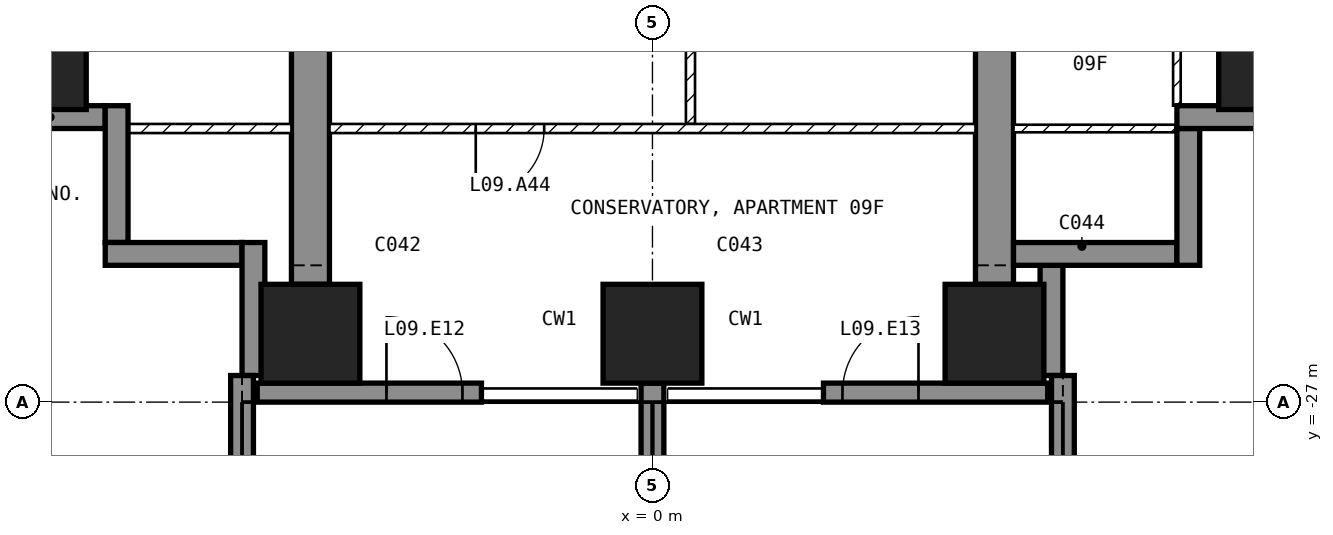
"""IFC4 building model, lengths in metres.
Left out: names, types, materials, properties, quantities, classifications, styles, units other than length and angle.
Written with IfcOpenShell. Run it as: python <this file> out.ifc"""

import sys

from ifc_helpers import new_model, si_unit, direction, frame, frame_2d, origin, origin_2d, place, context, subcontext, project, spatial, polyline, rectangle, outline, extrude, element, fill, save


model = new_model("IFC4")
c1 = context("Model", 3, precision=1e-05, world=origin(), true_north=direction((0.0, 1.0)))
c2 = subcontext(c1, "Body", "Model", "MODEL_VIEW")
j1 = project(units=[si_unit("LENGTHUNIT", "METRE"), si_unit("PLANEANGLEUNIT", "RADIAN")], contexts=[c1])
p1 = place(None, origin())
s1 = spatial("IfcSite", under=j1, at=p1, CompositionType="ELEMENT")
p2 = place(p1, origin())
s2 = spatial("IfcBuilding", under=s1, at=p2, CompositionType="ELEMENT")
p3 = place(p2, frame((0.0, 0.0, 50.5)))
s3 = spatial("IfcBuildingStorey", under=s2, at=p3, CompositionType="ELEMENT", Elevation=50.5)
for number, where, z_axis, x_axis in (
    (1, (-8.1, -22.5, -0.25), (0.0, 0.0, 1.0), (1.0, 0.0, 0.0)),
    (2, (-4.5, -26.1, -0.25), (0.0, 0.0, 1.0), (1.0, 0.0, 0.0)),
    (3, (0.0, -26.1, -0.25), (0.0, 0.0, 1.0), (1.0, 0.0, 0.0)),
    (4, (4.5, -26.1, -0.25), (0.0, 0.0, 1.0), (1.0, 0.0, 0.0)),
    (5, (8.1, -22.5, -0.25), (0.0, 0.0, 1.0), (1.0, 0.0, 0.0)),
):
    element("IfcColumn", number, at=place(p3, frame(where, z_axis=z_axis, x_axis=x_axis)), inside=s3, PredefinedType="COLUMN", context=c2, shape_type="SweptSolid", body=[
        extrude(rectangle(XDim=1.3, YDim=1.3, at=origin_2d()), origin(), (0.0, 0.0, 1.0), 3.5),
    ])
for number, where, z_axis, x_axis in (
    (6, (-4.75, -25.45, -0.25), (1.0, 0.0, 0.0), (0.0, 1.0, 0.0)),
    (7, (4.25, -25.45, -0.25), (1.0, 0.0, 0.0), (0.0, 1.0, 0.0)),
):
    element("IfcWall", number, at=place(p3, frame(where, z_axis=z_axis, x_axis=x_axis)), inside=s3, PredefinedType="SHEAR", context=c2, shape_type="SweptSolid", body=[
        extrude(outline(polyline([(0.0, 0.0), (4.15, 0.0), (4.15, 2.65), (6.55, 2.65), (6.55, 0.0), (11.95, 0.0), (11.95, 2.65), (14.35, 2.65), (14.35, 0.0), (16.45, 0.0), (16.45, 3.5), (0.0, 3.5), (0.0, 0.0)])), origin(), (0.0, 0.0, 1.0), 0.5),
    ])
p4 = place(p3, frame((-5.2, -26.875, 0.0), z_axis=(0.0, 0.0, 1.0), x_axis=(1.0, 0.0, 0.0)))
e8 = element("IfcWall", 8, at=p4, inside=s3, PredefinedType="SOLIDWALL", context=c2, shape_type="SweptSolid", body=[
    extrude(rectangle(XDim=2.95, YDim=0.25, at=frame_2d((1.475, 0.0))), origin(), (0.0, 0.0, 1.0), 3.25),
])
p5 = place(p4, frame((1.7, 0.0, 0.0)))
e9 = element("IfcOpeningElement", 9, at=p5, cuts=e8, PredefinedType="OPENING", context=c2, shape_type="SweptSolid", body=[
    extrude(rectangle(XDim=1.0, YDim=2.4, at=frame_2d((0.5, 1.2))), frame((0.0, 0.135, 0.0), z_axis=(0.0, -1.0, 0.0), x_axis=(1.0, 0.0, 0.0)), (0.0, 0.0, 1.0), 0.27),
])
p6 = place(p3, frame((2.25, -26.875, 0.0), z_axis=(0.0, 0.0, 1.0), x_axis=(1.0, 0.0, 0.0)))
e10 = element("IfcWall", 10, at=p6, inside=s3, PredefinedType="SOLIDWALL", context=c2, shape_type="SweptSolid", body=[
    extrude(rectangle(XDim=2.95, YDim=0.25, at=frame_2d((1.475, 0.0))), origin(), (0.0, 0.0, 1.0), 3.25),
])
p7 = place(p6, frame((0.25, 0.0, 0.0)))
e11 = element("IfcOpeningElement", 11, at=p7, cuts=e10, PredefinedType="OPENING", context=c2, shape_type="SweptSolid", body=[
    extrude(rectangle(XDim=1.0, YDim=2.4, at=frame_2d((0.5, 1.2))), frame((0.0, 0.135, 0.0), z_axis=(0.0, -1.0, 0.0), x_axis=(1.0, 0.0, 0.0)), (0.0, 0.0, 1.0), 0.27),
])
p8 = place(p3, frame((5.25, -26.65, 0.0), z_axis=(0.0, 0.0, 1.0), x_axis=(0.0, 1.0, 0.0)))
e12 = element("IfcWall", 12, at=p8, inside=s3, PredefinedType="SOLIDWALL", context=c2, shape_type="SweptSolid", body=[
    extrude(rectangle(XDim=1.45, YDim=0.3, at=frame_2d((0.725, 0.0))), origin(), (0.0, 0.0, 1.0), 3.25),
])
p9 = place(p3, frame((4.75, -25.05, 0.0), z_axis=(0.0, 0.0, 1.0), x_axis=(1.0, 0.0, 0.0)))
e13 = element("IfcWall", 13, at=p9, inside=s3, PredefinedType="SOLIDWALL", context=c2, shape_type="SweptSolid", body=[
    extrude(rectangle(XDim=2.15, YDim=0.3, at=frame_2d((1.075, 0.0))), origin(), (0.0, 0.0, 1.0), 3.25),
])
p10 = place(p3, frame((7.05, -25.2, 0.0), z_axis=(0.0, 0.0, 1.0), x_axis=(0.0, 1.0, 0.0)))
e14 = element("IfcWall", 14, at=p10, inside=s3, PredefinedType="SOLIDWALL", context=c2, shape_type="SweptSolid", body=[
    extrude(rectangle(XDim=1.8, YDim=0.3, at=frame_2d((0.9, 0.0))), origin(), (0.0, 0.0, 1.0), 3.25),
])
p11 = place(p3, frame((6.9, -23.25, 0.0), z_axis=(0.0, 0.0, 1.0), x_axis=(1.0, 0.0, 0.0)))
e15 = element("IfcWall", 15, at=p11, inside=s3, PredefinedType="SOLIDWALL", context=c2, shape_type="SweptSolid", body=[
    extrude(rectangle(XDim=1.75, YDim=0.3, at=frame_2d((0.875, 0.0))), origin(), (0.0, 0.0, 1.0), 3.25),
])
p12 = place(p3, frame((-8.65, -23.25, 0.0), z_axis=(0.0, 0.0, 1.0), x_axis=(1.0, 0.0, 0.0)))
e16 = element("IfcWall", 16, at=p12, inside=s3, PredefinedType="SOLIDWALL", context=c2, shape_type="SweptSolid", body=[
    extrude(rectangle(XDim=1.45, YDim=0.3, at=frame_2d((0.725, 0.0))), origin(), (0.0, 0.0, 1.0), 3.25),
])
p13 = place(p3, frame((-7.05, -23.1, 0.0), z_axis=(0.0, 0.0, 1.0), x_axis=(0.0, -1.0, 0.0)))
e17 = element("IfcWall", 17, at=p13, inside=s3, PredefinedType="SOLIDWALL", context=c2, shape_type="SweptSolid", body=[
    extrude(rectangle(XDim=1.8, YDim=0.3, at=frame_2d((0.9, 0.0))), origin(), (0.0, 0.0, 1.0), 3.25),
])
p14 = place(p3, frame((-7.2, -25.05, 0.0), z_axis=(0.0, 0.0, 1.0), x_axis=(1.0, 0.0, 0.0)))
e18 = element("IfcWall", 18, at=p14, inside=s3, PredefinedType="SOLIDWALL", context=c2, shape_type="SweptSolid", body=[
    extrude(rectangle(XDim=1.8, YDim=0.3, at=frame_2d((0.9, 0.0))), origin(), (0.0, 0.0, 1.0), 3.25),
])
p15 = place(p3, frame((-5.25, -24.9, 0.0), z_axis=(0.0, 0.0, 1.0), x_axis=(0.0, -1.0, 0.0)))
e19 = element("IfcWall", 19, at=p15, inside=s3, PredefinedType="SOLIDWALL", context=c2, shape_type="SweptSolid", body=[
    extrude(rectangle(XDim=1.75, YDim=0.3, at=frame_2d((0.875, 0.0))), origin(), (0.0, 0.0, 1.0), 3.25),
])
p16 = place(p3, frame((-5.4, -26.65, 0.0), z_axis=(0.0, 0.0, 1.0), x_axis=(0.0, -1.0, 0.0)))
e20 = element("IfcWall", 20, at=p16, inside=s3, PredefinedType="SOLIDWALL", context=c2, shape_type="SweptSolid", body=[
    extrude(rectangle(XDim=3.05, YDim=0.3, at=frame_2d((1.525, 0.0))), origin(), (0.0, 0.0, 1.0), 3.25),
])
p17 = place(p3, frame((0.0, -26.75, 0.0), z_axis=(0.0, 0.0, 1.0), x_axis=(0.0, -1.0, 0.0)))
e21 = element("IfcWall", 21, at=p17, inside=s3, PredefinedType="SOLIDWALL", context=c2, shape_type="SweptSolid", body=[
    extrude(rectangle(XDim=2.95, YDim=0.3, at=frame_2d((1.475, 0.0))), origin(), (0.0, 0.0, 1.0), 3.25),
])
p18 = place(p3, frame((5.4, -26.65, 0.0), z_axis=(0.0, 0.0, 1.0), x_axis=(0.0, -1.0, 0.0)))
e22 = element("IfcWall", 22, at=p18, inside=s3, PredefinedType="SOLIDWALL", context=c2, shape_type="SweptSolid", body=[
    extrude(rectangle(XDim=3.05, YDim=0.3, at=frame_2d((1.525, 0.0))), origin(), (0.0, 0.0, 1.0), 3.25),
])
p19 = place(p3, frame((0.5, -18.96, 0.0), z_axis=(0.0, 0.0, 1.0), x_axis=(0.0, -1.0, 0.0)))
e23 = element("IfcWall", 23, at=p19, inside=s3, PredefinedType="PARTITIONING", context=c2, shape_type="SweptSolid", body=[
    extrude(rectangle(XDim=4.38, YDim=0.12, at=frame_2d((2.19, 0.0))), origin(), (0.0, 0.0, 1.0), 3.25),
])
p20 = place(p19, frame((1.74, 0.0, 0.0)))
e24 = element("IfcOpeningElement", 24, at=p20, cuts=e23, PredefinedType="OPENING", context=c2, shape_type="SweptSolid", body=[
    extrude(rectangle(XDim=0.9, YDim=2.1, at=frame_2d((0.45, 1.05))), frame((0.0, 0.07, 0.0), z_axis=(0.0, -1.0, 0.0), x_axis=(1.0, 0.0, 0.0)), (0.0, 0.0, 1.0), 0.14),
])
p21 = place(p3, frame((4.25, -23.4, 0.0), z_axis=(0.0, 0.0, 1.0), x_axis=(-1.0, 0.0, 0.0)))
e25 = element("IfcWall", 25, at=p21, inside=s3, PredefinedType="PARTITIONING", context=c2, shape_type="SweptSolid", body=[
    extrude(rectangle(XDim=8.5, YDim=0.12, at=frame_2d((4.25, 0.0))), origin(), (0.0, 0.0, 1.0), 3.25),
])
p22 = place(p21, frame((5.675, 0.0, 0.0)))
e26 = element("IfcOpeningElement", 26, at=p22, cuts=e25, PredefinedType="OPENING", context=c2, shape_type="SweptSolid", body=[
    extrude(rectangle(XDim=0.9, YDim=2.1, at=frame_2d((0.45, 1.05))), frame((0.0, 0.07, 0.0), z_axis=(0.0, -1.0, 0.0), x_axis=(1.0, 0.0, 0.0)), (0.0, 0.0, 1.0), 0.14),
])
p23 = place(p3, frame((6.9, -23.1, 0.0), z_axis=(0.0, 0.0, 1.0), x_axis=(0.0, 1.0, 0.0)))
e27 = element("IfcWall", 27, at=p23, inside=s3, PredefinedType="PARTITIONING", context=c2, shape_type="SweptSolid", body=[
    extrude(rectangle(XDim=2.65, YDim=0.1, at=frame_2d((1.325, 0.0))), origin(), (0.0, 0.0, 1.0), 3.25),
])
p24 = place(p3, frame((7.12, -23.4, 0.0), z_axis=(0.0, 0.0, 1.0), x_axis=(-1.0, 0.0, 0.0)))
e28 = element("IfcWall", 28, at=p24, inside=s3, PredefinedType="PARTITIONING", context=c2, shape_type="SweptSolid", body=[
    extrude(rectangle(XDim=2.37, YDim=0.1, at=frame_2d((1.185, 0.0))), origin(), (0.0, 0.0, 1.0), 3.25),
])
p25 = place(p3, frame((-4.75, -23.4, 0.0), z_axis=(0.0, 0.0, 1.0), x_axis=(-1.0, 0.0, 0.0)))
e29 = element("IfcWall", 29, at=p25, inside=s3, PredefinedType="PARTITIONING", context=c2, shape_type="SweptSolid", body=[
    extrude(rectangle(XDim=2.37, YDim=0.12, at=frame_2d((1.185, 0.0))), origin(), (0.0, 0.0, 1.0), 3.25),
])
p26 = place(p5, origin())
e30 = element("IfcDoor", 30, at=p26, inside=s3, OperationType="SINGLE_SWING_LEFT", PredefinedType="DOOR", context=c2, shape_type="SweptSolid", body=[
    extrude(rectangle(XDim=1.0, YDim=2.4, at=frame_2d((0.5, 1.2))), frame((0.0, 0.025, 0.0), z_axis=(0.0, -1.0, 0.0), x_axis=(1.0, 0.0, 0.0)), (0.0, 0.0, 1.0), 0.05),
])
fill(e9, e30)
p27 = place(p7, origin())
e31 = element("IfcDoor", 31, at=p27, inside=s3, OperationType="SINGLE_SWING_RIGHT", PredefinedType="DOOR", context=c2, shape_type="SweptSolid", body=[
    extrude(rectangle(XDim=1.0, YDim=2.4, at=frame_2d((0.5, 1.2))), frame((0.0, 0.025, 0.0), z_axis=(0.0, -1.0, 0.0), x_axis=(1.0, 0.0, 0.0)), (0.0, 0.0, 1.0), 0.05),
])
fill(e11, e31)
p28 = place(p22, origin())
e32 = element("IfcDoor", 32, at=p28, inside=s3, OperationType="SINGLE_SWING_RIGHT", PredefinedType="DOOR", context=c2, shape_type="SweptSolid", body=[
    extrude(rectangle(XDim=0.9, YDim=2.1, at=frame_2d((0.45, 1.05))), frame((0.0, 0.025, 0.0), z_axis=(0.0, -1.0, 0.0), x_axis=(1.0, 0.0, 0.0)), (0.0, 0.0, 1.0), 0.05),
])
fill(e26, e32)
save(model, sys.argv[1])
